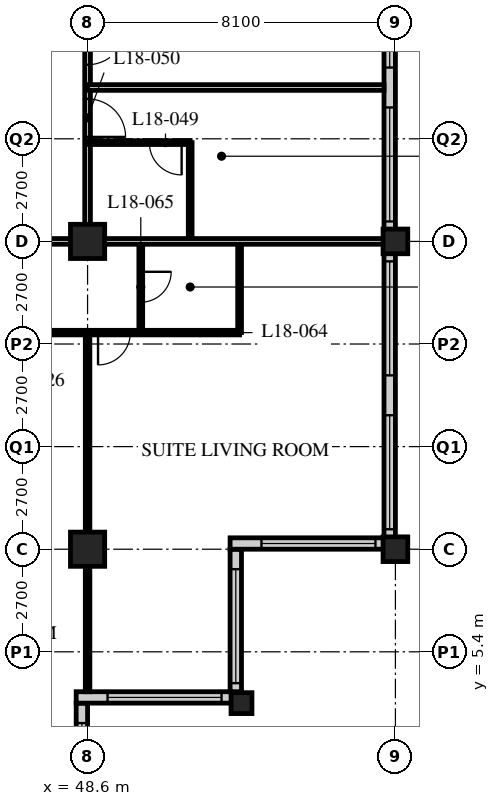
"""IFC4 building model, lengths in metres.
Left out: names, types, materials, properties, quantities, classifications, styles, units other than length and angle.
Written with IfcOpenShell. Run it as: python <this file> out.ifc"""

import sys

from ifc_helpers import new_model, si_unit, direction, frame, frame_2d, origin, origin_2d, place, context, subcontext, project, spatial, rectangle, hollow_rectangle, extrude, element, fill, save


model = new_model("IFC4")
c1 = context("Model", 3, precision=1e-05, world=origin(), true_north=direction((0.0, 1.0)))
c2 = subcontext(c1, "Body", "Model", "MODEL_VIEW")
j1 = project(units=[si_unit("LENGTHUNIT", "METRE"), si_unit("PLANEANGLEUNIT", "RADIAN")], contexts=[c1])
p1 = place(None, origin())
s1 = spatial("IfcSite", under=j1, at=p1, CompositionType="ELEMENT")
p2 = place(p1, origin())
s2 = spatial("IfcBuilding", under=s1, at=p2, CompositionType="ELEMENT")
p3 = place(p2, frame((0.0, 0.0, 73.8)))
s3 = spatial("IfcBuildingStorey", under=s2, at=p3, CompositionType="ELEMENT", Elevation=73.8)
for number, where, z_axis, x_axis in (
    (1, (48.6, 8.1, 0.0), (0.0, 0.0, 1.0), (1.0, 0.0, 0.0)),
    (2, (48.6, 16.2, 0.0), (0.0, 0.0, 1.0), (1.0, 0.0, 0.0)),
):
    element("IfcColumn", number, at=place(p3, frame(where, z_axis=z_axis, x_axis=x_axis)), inside=s3, PredefinedType="COLUMN", context=c2, shape_type="SweptSolid", body=[
        extrude(hollow_rectangle(XDim=0.9, YDim=0.9, WallThickness=0.09, at=origin_2d()), origin(), (0.0, 0.0, 1.0), 3.4),
    ])
p4 = place(p3, frame((52.65, 4.05, 0.0), z_axis=(0.0, 0.0, 1.0), x_axis=(1.0, 0.0, 0.0)))
e3 = element("IfcColumn", 3, at=p4, inside=s3, PredefinedType="COLUMN", context=c2, shape_type="SweptSolid", body=[
    extrude(hollow_rectangle(XDim=0.55, YDim=0.55, WallThickness=0.05, at=origin_2d()), origin(), (0.0, 0.0, 1.0), 3.4),
])
for number, where, z_axis, x_axis in (
    (4, (56.7, 8.1, 0.0), (0.0, 0.0, 1.0), (1.0, 0.0, 0.0)),
    (5, (56.7, 16.2, 0.0), (0.0, 0.0, 1.0), (1.0, 0.0, 0.0)),
):
    element("IfcColumn", number, at=place(p3, frame(where, z_axis=z_axis, x_axis=x_axis)), inside=s3, PredefinedType="COLUMN", context=c2, shape_type="SweptSolid", body=[
        extrude(hollow_rectangle(XDim=0.65, YDim=0.65, WallThickness=0.05, at=origin_2d()), origin(), (0.0, 0.0, 1.0), 3.4),
    ])
p5 = place(p3, frame((48.45, 0.3, 0.0), z_axis=(0.0, 0.0, 1.0), x_axis=(0.0, 1.0, 0.0)))
e6 = element("IfcWall", 6, at=p5, inside=s3, PredefinedType="SOLIDWALL", context=c2, shape_type="SweptSolid", body=[
    extrude(rectangle(XDim=3.75, YDim=0.3, at=frame_2d((1.875, 0.0))), origin(), (0.0, 0.0, 1.0), 3.19),
])
p6 = place(p5, frame((0.225, 0.0, 0.9)))
e7 = element("IfcOpeningElement", 7, at=p6, cuts=e6, PredefinedType="OPENING", context=c2, shape_type="SweptSolid", body=[
    extrude(rectangle(XDim=3.0, YDim=1.5, at=frame_2d((1.5, 0.75))), frame((0.0, 0.16, 0.0), z_axis=(0.0, -1.0, 0.0), x_axis=(1.0, 0.0, 0.0)), (0.0, 0.0, 1.0), 0.32),
])
p7 = place(p3, frame((48.3, 4.2, 0.0), z_axis=(0.0, 0.0, 1.0), x_axis=(1.0, 0.0, 0.0)))
e8 = element("IfcWall", 8, at=p7, inside=s3, PredefinedType="SOLIDWALL", context=c2, shape_type="SweptSolid", body=[
    extrude(rectangle(XDim=4.35, YDim=0.3, at=frame_2d((2.175, 0.0))), origin(), (0.0, 0.0, 1.0), 3.19),
])
p8 = place(p7, frame((0.825, 0.0, 0.9)))
e9 = element("IfcOpeningElement", 9, at=p8, cuts=e8, PredefinedType="OPENING", context=c2, shape_type="SweptSolid", body=[
    extrude(rectangle(XDim=3.0, YDim=1.5, at=frame_2d((1.5, 0.75))), frame((0.0, 0.16, 0.0), z_axis=(0.0, -1.0, 0.0), x_axis=(1.0, 0.0, 0.0)), (0.0, 0.0, 1.0), 0.32),
])
p9 = place(p3, frame((52.5, 4.35, 0.0), z_axis=(0.0, 0.0, 1.0), x_axis=(0.0, 1.0, 0.0)))
e10 = element("IfcWall", 10, at=p9, inside=s3, PredefinedType="SOLIDWALL", context=c2, shape_type="SweptSolid", body=[
    extrude(rectangle(XDim=3.75, YDim=0.3, at=frame_2d((1.875, 0.0))), origin(), (0.0, 0.0, 1.0), 3.19),
])
p10 = place(p9, frame((0.225, 0.0, 0.9)))
e11 = element("IfcOpeningElement", 11, at=p10, cuts=e10, PredefinedType="OPENING", context=c2, shape_type="SweptSolid", body=[
    extrude(rectangle(XDim=3.0, YDim=1.5, at=frame_2d((1.5, 0.75))), frame((0.0, 0.16, 0.0), z_axis=(0.0, -1.0, 0.0), x_axis=(1.0, 0.0, 0.0)), (0.0, 0.0, 1.0), 0.32),
])
p11 = place(p3, frame((52.35, 8.25, 0.0), z_axis=(0.0, 0.0, 1.0), x_axis=(1.0, 0.0, 0.0)))
e12 = element("IfcWall", 12, at=p11, inside=s3, PredefinedType="SOLIDWALL", context=c2, shape_type="SweptSolid", body=[
    extrude(rectangle(XDim=4.35, YDim=0.3, at=frame_2d((2.175, 0.0))), origin(), (0.0, 0.0, 1.0), 3.19),
])
p12 = place(p11, frame((0.825, 0.0, 0.9)))
e13 = element("IfcOpeningElement", 13, at=p12, cuts=e12, PredefinedType="OPENING", context=c2, shape_type="SweptSolid", body=[
    extrude(rectangle(XDim=3.0, YDim=1.5, at=frame_2d((1.5, 0.75))), frame((0.0, 0.16, 0.0), z_axis=(0.0, -1.0, 0.0), x_axis=(1.0, 0.0, 0.0)), (0.0, 0.0, 1.0), 0.32),
])
p13 = place(p3, frame((56.55, 8.4, 0.0), z_axis=(0.0, 0.0, 1.0), x_axis=(0.0, 1.0, 0.0)))
e14 = element("IfcWall", 14, at=p13, inside=s3, PredefinedType="SOLIDWALL", context=c2, shape_type="SweptSolid", body=[
    extrude(rectangle(XDim=32.1, YDim=0.3, at=frame_2d((16.05, 0.0))), origin(), (0.0, 0.0, 1.0), 3.19),
])
p14 = place(p13, frame((0.225, 0.0, 0.9)))
e15 = element("IfcOpeningElement", 15, at=p14, cuts=e14, PredefinedType="OPENING", context=c2, shape_type="SweptSolid", body=[
    extrude(rectangle(XDim=3.0, YDim=2.0, at=frame_2d((1.5, 1.0))), frame((0.0, 0.16, 0.0), z_axis=(0.0, -1.0, 0.0), x_axis=(1.0, 0.0, 0.0)), (0.0, 0.0, 1.0), 0.32),
])
p15 = place(p13, frame((4.275, 0.0, 0.9)))
e16 = element("IfcOpeningElement", 16, at=p15, cuts=e14, PredefinedType="OPENING", context=c2, shape_type="SweptSolid", body=[
    extrude(rectangle(XDim=3.0, YDim=2.0, at=frame_2d((1.5, 1.0))), frame((0.0, 0.16, 0.0), z_axis=(0.0, -1.0, 0.0), x_axis=(1.0, 0.0, 0.0)), (0.0, 0.0, 1.0), 0.32),
])
p16 = place(p13, frame((8.325, 0.0, 0.9)))
e17 = element("IfcOpeningElement", 17, at=p16, cuts=e14, PredefinedType="OPENING", context=c2, shape_type="SweptSolid", body=[
    extrude(rectangle(XDim=3.0, YDim=2.0, at=frame_2d((1.5, 1.0))), frame((0.0, 0.16, 0.0), z_axis=(0.0, -1.0, 0.0), x_axis=(1.0, 0.0, 0.0)), (0.0, 0.0, 1.0), 0.32),
])
p17 = place(p13, frame((12.375, 0.0, 0.9)))
e18 = element("IfcOpeningElement", 18, at=p17, cuts=e14, PredefinedType="OPENING", context=c2, shape_type="SweptSolid", body=[
    extrude(rectangle(XDim=3.0, YDim=2.0, at=frame_2d((1.5, 1.0))), frame((0.0, 0.16, 0.0), z_axis=(0.0, -1.0, 0.0), x_axis=(1.0, 0.0, 0.0)), (0.0, 0.0, 1.0), 0.32),
])
p18 = place(p13, frame((16.425, 0.0, 0.9)))
e19 = element("IfcOpeningElement", 19, at=p18, cuts=e14, PredefinedType="OPENING", context=c2, shape_type="SweptSolid", body=[
    extrude(rectangle(XDim=3.0, YDim=2.0, at=frame_2d((1.5, 1.0))), frame((0.0, 0.16, 0.0), z_axis=(0.0, -1.0, 0.0), x_axis=(1.0, 0.0, 0.0)), (0.0, 0.0, 1.0), 0.32),
])
p19 = place(p13, frame((20.475, 0.0, 0.9)))
e20 = element("IfcOpeningElement", 20, at=p19, cuts=e14, PredefinedType="OPENING", context=c2, shape_type="SweptSolid", body=[
    extrude(rectangle(XDim=3.0, YDim=2.0, at=frame_2d((1.5, 1.0))), frame((0.0, 0.16, 0.0), z_axis=(0.0, -1.0, 0.0), x_axis=(1.0, 0.0, 0.0)), (0.0, 0.0, 1.0), 0.32),
])
p20 = place(p13, frame((24.525, 0.0, 0.9)))
e21 = element("IfcOpeningElement", 21, at=p20, cuts=e14, PredefinedType="OPENING", context=c2, shape_type="SweptSolid", body=[
    extrude(rectangle(XDim=3.0, YDim=2.0, at=frame_2d((1.5, 1.0))), frame((0.0, 0.16, 0.0), z_axis=(0.0, -1.0, 0.0), x_axis=(1.0, 0.0, 0.0)), (0.0, 0.0, 1.0), 0.32),
])
p21 = place(p13, frame((28.575, 0.0, 0.9)))
e22 = element("IfcOpeningElement", 22, at=p21, cuts=e14, PredefinedType="OPENING", context=c2, shape_type="SweptSolid", body=[
    extrude(rectangle(XDim=3.0, YDim=2.0, at=frame_2d((1.5, 1.0))), frame((0.0, 0.16, 0.0), z_axis=(0.0, -1.0, 0.0), x_axis=(1.0, 0.0, 0.0)), (0.0, 0.0, 1.0), 0.32),
])
p22 = place(p3, frame((12.15, 16.2, 0.0), z_axis=(0.0, 0.0, 1.0), x_axis=(1.0, 0.0, 0.0)))
e23 = element("IfcWall", 23, at=p22, inside=s3, PredefinedType="PARTITIONING", context=c2, shape_type="SweptSolid", body=[
    extrude(rectangle(XDim=36.45, YDim=0.15, at=frame_2d((18.225, 0.0))), origin(), (0.0, 0.0, 1.0), 2.578),
])
p23 = place(p22, frame((6.5, 0.0, 0.0)))
e24 = element("IfcOpeningElement", 24, at=p23, cuts=e23, PredefinedType="OPENING", context=c2, shape_type="SweptSolid", body=[
    extrude(rectangle(XDim=1.0, YDim=2.1, at=frame_2d((0.5, 1.05))), frame((0.0, 0.085, 0.0), z_axis=(0.0, -1.0, 0.0), x_axis=(1.0, 0.0, 0.0)), (0.0, 0.0, 1.0), 0.17),
])
p24 = place(p22, frame((8.4, 0.0, 0.0)))
e25 = element("IfcOpeningElement", 25, at=p24, cuts=e23, PredefinedType="OPENING", context=c2, shape_type="SweptSolid", body=[
    extrude(rectangle(XDim=1.0, YDim=2.1, at=frame_2d((0.5, 1.05))), frame((0.0, 0.085, 0.0), z_axis=(0.0, -1.0, 0.0), x_axis=(1.0, 0.0, 0.0)), (0.0, 0.0, 1.0), 0.17),
])
p25 = place(p22, frame((14.9, 0.0, 0.0)))
e26 = element("IfcOpeningElement", 26, at=p25, cuts=e23, PredefinedType="OPENING", context=c2, shape_type="SweptSolid", body=[
    extrude(rectangle(XDim=1.0, YDim=2.1, at=frame_2d((0.5, 1.05))), frame((0.0, 0.085, 0.0), z_axis=(0.0, -1.0, 0.0), x_axis=(1.0, 0.0, 0.0)), (0.0, 0.0, 1.0), 0.17),
])
p26 = place(p22, frame((16.5, 0.0, 0.0)))
e27 = element("IfcOpeningElement", 27, at=p26, cuts=e23, PredefinedType="OPENING", context=c2, shape_type="SweptSolid", body=[
    extrude(rectangle(XDim=1.0, YDim=2.1, at=frame_2d((0.5, 1.05))), frame((0.0, 0.085, 0.0), z_axis=(0.0, -1.0, 0.0), x_axis=(1.0, 0.0, 0.0)), (0.0, 0.0, 1.0), 0.17),
])
p27 = place(p22, frame((22.7, 0.0, 0.0)))
e28 = element("IfcOpeningElement", 28, at=p27, cuts=e23, PredefinedType="OPENING", context=c2, shape_type="SweptSolid", body=[
    extrude(rectangle(XDim=1.0, YDim=2.1, at=frame_2d((0.5, 1.05))), frame((0.0, 0.085, 0.0), z_axis=(0.0, -1.0, 0.0), x_axis=(1.0, 0.0, 0.0)), (0.0, 0.0, 1.0), 0.17),
])
p28 = place(p22, frame((24.9, 0.0, 0.0)))
e29 = element("IfcOpeningElement", 29, at=p28, cuts=e23, PredefinedType="OPENING", context=c2, shape_type="SweptSolid", body=[
    extrude(rectangle(XDim=1.0, YDim=2.1, at=frame_2d((0.5, 1.05))), frame((0.0, 0.085, 0.0), z_axis=(0.0, -1.0, 0.0), x_axis=(1.0, 0.0, 0.0)), (0.0, 0.0, 1.0), 0.17),
])
p29 = place(p22, frame((30.8, 0.0, 0.0)))
e30 = element("IfcOpeningElement", 30, at=p29, cuts=e23, PredefinedType="OPENING", context=c2, shape_type="SweptSolid", body=[
    extrude(rectangle(XDim=1.0, YDim=2.1, at=frame_2d((0.5, 1.05))), frame((0.0, 0.085, 0.0), z_axis=(0.0, -1.0, 0.0), x_axis=(1.0, 0.0, 0.0)), (0.0, 0.0, 1.0), 0.17),
])
p30 = place(p22, frame((1.525, 0.0, 0.0)))
e31 = element("IfcOpeningElement", 31, at=p30, cuts=e23, PredefinedType="OPENING", context=c2, shape_type="SweptSolid", body=[
    extrude(rectangle(XDim=1.0, YDim=2.1, at=frame_2d((0.5, 1.05))), frame((0.0, 0.085, 0.0), z_axis=(0.0, -1.0, 0.0), x_axis=(1.0, 0.0, 0.0)), (0.0, 0.0, 1.0), 0.17),
])
p31 = place(p22, frame((33.925, 0.0, 0.0)))
e32 = element("IfcOpeningElement", 32, at=p31, cuts=e23, PredefinedType="OPENING", context=c2, shape_type="SweptSolid", body=[
    extrude(rectangle(XDim=1.0, YDim=2.1, at=frame_2d((0.5, 1.05))), frame((0.0, 0.085, 0.0), z_axis=(0.0, -1.0, 0.0), x_axis=(1.0, 0.0, 0.0)), (0.0, 0.0, 1.0), 0.17),
])
p32 = place(p3, frame((48.6, 16.2, 0.0), z_axis=(0.0, 0.0, 1.0), x_axis=(0.0, 1.0, 0.0)))
e33 = element("IfcWall", 33, at=p32, inside=s3, PredefinedType="PARTITIONING", context=c2, shape_type="SweptSolid", body=[
    extrude(rectangle(XDim=26.1, YDim=0.15, at=frame_2d((13.05, 0.0))), origin(), (0.0, 0.0, 1.0), 2.578),
])
p33 = place(p32, frame((2.75, 0.0, 0.0)))
e34 = element("IfcOpeningElement", 34, at=p33, cuts=e33, PredefinedType="OPENING", context=c2, shape_type="SweptSolid", body=[
    extrude(rectangle(XDim=1.0, YDim=2.1, at=frame_2d((0.5, 1.05))), frame((0.0, 0.085, 0.0), z_axis=(0.0, -1.0, 0.0), x_axis=(1.0, 0.0, 0.0)), (0.0, 0.0, 1.0), 0.17),
])
p34 = place(p32, frame((4.65, 0.0, 0.0)))
e35 = element("IfcOpeningElement", 35, at=p34, cuts=e33, PredefinedType="OPENING", context=c2, shape_type="SweptSolid", body=[
    extrude(rectangle(XDim=1.0, YDim=2.1, at=frame_2d((0.5, 1.05))), frame((0.0, 0.085, 0.0), z_axis=(0.0, -1.0, 0.0), x_axis=(1.0, 0.0, 0.0)), (0.0, 0.0, 1.0), 0.17),
])
p35 = place(p32, frame((13.55, 0.0, 0.0)))
e36 = element("IfcOpeningElement", 36, at=p35, cuts=e33, PredefinedType="OPENING", context=c2, shape_type="SweptSolid", body=[
    extrude(rectangle(XDim=1.0, YDim=2.1, at=frame_2d((0.5, 1.05))), frame((0.0, 0.085, 0.0), z_axis=(0.0, -1.0, 0.0), x_axis=(1.0, 0.0, 0.0)), (0.0, 0.0, 1.0), 0.17),
])
p36 = place(p32, frame((21.65, 0.0, 0.0)))
e37 = element("IfcOpeningElement", 37, at=p36, cuts=e33, PredefinedType="OPENING", context=c2, shape_type="SweptSolid", body=[
    extrude(rectangle(XDim=1.0, YDim=2.1, at=frame_2d((0.5, 1.05))), frame((0.0, 0.085, 0.0), z_axis=(0.0, -1.0, 0.0), x_axis=(1.0, 0.0, 0.0)), (0.0, 0.0, 1.0), 0.17),
])
p37 = place(p3, frame((51.3, 16.2, 0.0), z_axis=(0.0, 0.0, 1.0), x_axis=(0.0, 1.0, 0.0)))
e38 = element("IfcWall", 38, at=p37, inside=s3, PredefinedType="PARTITIONING", context=c2, shape_type="SweptSolid", body=[
    extrude(rectangle(XDim=2.6, YDim=0.1, at=frame_2d((1.3, 0.0))), origin(), (0.0, 0.0, 1.0), 3.19),
])
p38 = place(p3, frame((48.6, 18.8, 0.0), z_axis=(0.0, 0.0, 1.0), x_axis=(1.0, 0.0, 0.0)))
e39 = element("IfcWall", 39, at=p38, inside=s3, PredefinedType="PARTITIONING", context=c2, shape_type="SweptSolid", body=[
    extrude(rectangle(XDim=2.7, YDim=0.1, at=frame_2d((1.35, 0.0))), origin(), (0.0, 0.0, 1.0), 3.19),
])
p39 = place(p38, frame((1.625, 0.0, 0.0)))
e40 = element("IfcOpeningElement", 40, at=p39, cuts=e39, PredefinedType="OPENING", context=c2, shape_type="SweptSolid", body=[
    extrude(rectangle(XDim=0.85, YDim=2.1, at=frame_2d((0.425, 1.05))), frame((0.0, 0.06, 0.0), z_axis=(0.0, -1.0, 0.0), x_axis=(1.0, 0.0, 0.0)), (0.0, 0.0, 1.0), 0.12),
])
p40 = place(p3, frame((48.6, 20.25, 0.0), z_axis=(0.0, 0.0, 1.0), x_axis=(1.0, 0.0, 0.0)))
e41 = element("IfcWall", 41, at=p40, inside=s3, PredefinedType="PARTITIONING", context=c2, shape_type="SweptSolid", body=[
    extrude(rectangle(XDim=7.8, YDim=0.15, at=frame_2d((3.9, 0.0))), origin(), (0.0, 0.0, 1.0), 3.19),
])
p41 = place(p3, frame((44.55, 13.8, 0.0), z_axis=(0.0, 0.0, 1.0), x_axis=(1.0, 0.0, 0.0)))
e42 = element("IfcWall", 42, at=p41, inside=s3, PredefinedType="PARTITIONING", context=c2, shape_type="SweptSolid", body=[
    extrude(rectangle(XDim=8.05, YDim=0.12, at=frame_2d((4.025, 0.0))), origin(), (0.0, 0.0, 1.0), 3.19),
])
p42 = place(p41, frame((0.475, 0.0, 0.0)))
e43 = element("IfcOpeningElement", 43, at=p42, cuts=e42, PredefinedType="OPENING", context=c2, shape_type="SweptSolid", body=[
    extrude(rectangle(XDim=0.85, YDim=2.1, at=frame_2d((0.425, 1.05))), frame((0.0, 0.07, 0.0), z_axis=(0.0, -1.0, 0.0), x_axis=(1.0, 0.0, 0.0)), (0.0, 0.0, 1.0), 0.14),
])
p43 = place(p41, frame((4.325, 0.0, 0.0)))
e44 = element("IfcOpeningElement", 44, at=p43, cuts=e42, PredefinedType="OPENING", context=c2, shape_type="SweptSolid", body=[
    extrude(rectangle(XDim=0.85, YDim=2.1, at=frame_2d((0.425, 1.05))), frame((0.0, 0.07, 0.0), z_axis=(0.0, -1.0, 0.0), x_axis=(1.0, 0.0, 0.0)), (0.0, 0.0, 1.0), 0.14),
])
p44 = place(p3, frame((50.0, 16.2, 0.0), z_axis=(0.0, 0.0, 1.0), x_axis=(0.0, -1.0, 0.0)))
e45 = element("IfcWall", 45, at=p44, inside=s3, PredefinedType="PARTITIONING", context=c2, shape_type="SweptSolid", body=[
    extrude(rectangle(XDim=2.4, YDim=0.1, at=frame_2d((1.2, 0.0))), origin(), (0.0, 0.0, 1.0), 3.19),
])
p45 = place(p44, frame((0.8, 0.0, 0.0)))
e46 = element("IfcOpeningElement", 46, at=p45, cuts=e45, PredefinedType="OPENING", context=c2, shape_type="SweptSolid", body=[
    extrude(rectangle(XDim=0.8, YDim=2.1, at=frame_2d((0.4, 1.05))), frame((0.0, 0.06, 0.0), z_axis=(0.0, -1.0, 0.0), x_axis=(1.0, 0.0, 0.0)), (0.0, 0.0, 1.0), 0.12),
])
p46 = place(p3, frame((52.6, 16.2, 0.0), z_axis=(0.0, 0.0, 1.0), x_axis=(0.0, -1.0, 0.0)))
e47 = element("IfcWall", 47, at=p46, inside=s3, PredefinedType="PARTITIONING", context=c2, shape_type="SweptSolid", body=[
    extrude(rectangle(XDim=2.4, YDim=0.1, at=frame_2d((1.2, 0.0))), origin(), (0.0, 0.0, 1.0), 3.19),
])
p47 = place(p3, frame((48.6, 13.8, 0.0), z_axis=(0.0, 0.0, 1.0), x_axis=(0.0, -1.0, 0.0)))
e48 = element("IfcWall", 48, at=p47, inside=s3, PredefinedType="PARTITIONING", context=c2, shape_type="SweptSolid", body=[
    extrude(rectangle(XDim=9.45, YDim=0.12, at=frame_2d((4.725, 0.0))), origin(), (0.0, 0.0, 1.0), 2.578),
])
p48 = place(p3, frame((48.6, 16.2, 0.0), z_axis=(0.0, 0.0, 1.0), x_axis=(1.0, 0.0, 0.0)))
e49 = element("IfcWall", 49, at=p48, inside=s3, PredefinedType="PARTITIONING", context=c2, shape_type="SweptSolid", body=[
    extrude(rectangle(XDim=7.8, YDim=0.15, at=frame_2d((3.9, 0.0))), origin(), (0.0, 0.0, 1.0), 2.578),
])
p49 = place(p6, origin())
e50 = element("IfcWindow", 50, at=p49, inside=s3, PartitioningType="SINGLE_PANEL", PredefinedType="WINDOW", context=c2, shape_type="SweptSolid", body=[
    extrude(rectangle(XDim=3.0, YDim=1.5, at=frame_2d((1.5, 0.75))), frame((0.0, 0.03, 0.0), z_axis=(0.0, -1.0, 0.0), x_axis=(1.0, 0.0, 0.0)), (0.0, 0.0, 1.0), 0.06),
])
fill(e7, e50)
p50 = place(p8, origin())
e51 = element("IfcWindow", 51, at=p50, inside=s3, PartitioningType="SINGLE_PANEL", PredefinedType="WINDOW", context=c2, shape_type="SweptSolid", body=[
    extrude(rectangle(XDim=3.0, YDim=1.5, at=frame_2d((1.5, 0.75))), frame((0.0, 0.03, 0.0), z_axis=(0.0, -1.0, 0.0), x_axis=(1.0, 0.0, 0.0)), (0.0, 0.0, 1.0), 0.06),
])
fill(e9, e51)
p51 = place(p10, origin())
e52 = element("IfcWindow", 52, at=p51, inside=s3, PartitioningType="SINGLE_PANEL", PredefinedType="WINDOW", context=c2, shape_type="SweptSolid", body=[
    extrude(rectangle(XDim=3.0, YDim=1.5, at=frame_2d((1.5, 0.75))), frame((0.0, 0.03, 0.0), z_axis=(0.0, -1.0, 0.0), x_axis=(1.0, 0.0, 0.0)), (0.0, 0.0, 1.0), 0.06),
])
fill(e11, e52)
p52 = place(p12, origin())
e53 = element("IfcWindow", 53, at=p52, inside=s3, PartitioningType="SINGLE_PANEL", PredefinedType="WINDOW", context=c2, shape_type="SweptSolid", body=[
    extrude(rectangle(XDim=3.0, YDim=1.5, at=frame_2d((1.5, 0.75))), frame((0.0, 0.03, 0.0), z_axis=(0.0, -1.0, 0.0), x_axis=(1.0, 0.0, 0.0)), (0.0, 0.0, 1.0), 0.06),
])
fill(e13, e53)
p53 = place(p14, origin())
e54 = element("IfcWindow", 54, at=p53, inside=s3, PartitioningType="SINGLE_PANEL", PredefinedType="WINDOW", context=c2, shape_type="SweptSolid", body=[
    extrude(rectangle(XDim=3.0, YDim=2.0, at=frame_2d((1.5, 1.0))), frame((0.0, 0.03, 0.0), z_axis=(0.0, -1.0, 0.0), x_axis=(1.0, 0.0, 0.0)), (0.0, 0.0, 1.0), 0.06),
])
fill(e15, e54)
p54 = place(p15, origin())
e55 = element("IfcWindow", 55, at=p54, inside=s3, PartitioningType="SINGLE_PANEL", PredefinedType="WINDOW", context=c2, shape_type="SweptSolid", body=[
    extrude(rectangle(XDim=3.0, YDim=2.0, at=frame_2d((1.5, 1.0))), frame((0.0, 0.03, 0.0), z_axis=(0.0, -1.0, 0.0), x_axis=(1.0, 0.0, 0.0)), (0.0, 0.0, 1.0), 0.06),
])
fill(e16, e55)
p55 = place(p16, origin())
e56 = element("IfcWindow", 56, at=p55, inside=s3, PartitioningType="SINGLE_PANEL", PredefinedType="WINDOW", context=c2, shape_type="SweptSolid", body=[
    extrude(rectangle(XDim=3.0, YDim=2.0, at=frame_2d((1.5, 1.0))), frame((0.0, 0.03, 0.0), z_axis=(0.0, -1.0, 0.0), x_axis=(1.0, 0.0, 0.0)), (0.0, 0.0, 1.0), 0.06),
])
fill(e17, e56)
p56 = place(p17, origin())
e57 = element("IfcWindow", 57, at=p56, inside=s3, PartitioningType="SINGLE_PANEL", PredefinedType="WINDOW", context=c2, shape_type="SweptSolid", body=[
    extrude(rectangle(XDim=3.0, YDim=2.0, at=frame_2d((1.5, 1.0))), frame((0.0, 0.03, 0.0), z_axis=(0.0, -1.0, 0.0), x_axis=(1.0, 0.0, 0.0)), (0.0, 0.0, 1.0), 0.06),
])
fill(e18, e57)
p57 = place(p39, origin())
e58 = element("IfcDoor", 58, at=p57, inside=s3, OperationType="SINGLE_SWING_LEFT", PredefinedType="DOOR", context=c2, shape_type="SweptSolid", body=[
    extrude(rectangle(XDim=0.85, YDim=2.1, at=frame_2d((0.425, 1.05))), frame((0.0, 0.025, 0.0), z_axis=(0.0, -1.0, 0.0), x_axis=(1.0, 0.0, 0.0)), (0.0, 0.0, 1.0), 0.05),
])
fill(e40, e58)
p58 = place(p33, origin())
e59 = element("IfcDoor", 59, at=p58, inside=s3, OperationType="SINGLE_SWING_RIGHT", PredefinedType="DOOR", context=c2, shape_type="SweptSolid", body=[
    extrude(rectangle(XDim=1.0, YDim=2.1, at=frame_2d((0.5, 1.05))), frame((0.0, 0.025, 0.0), z_axis=(0.0, -1.0, 0.0), x_axis=(1.0, 0.0, 0.0)), (0.0, 0.0, 1.0), 0.05),
])
fill(e34, e59)
p59 = place(p34, origin())
e60 = element("IfcDoor", 60, at=p59, inside=s3, OperationType="SINGLE_SWING_LEFT", PredefinedType="DOOR", context=c2, shape_type="SweptSolid", body=[
    extrude(rectangle(XDim=1.0, YDim=2.1, at=frame_2d((0.5, 1.05))), frame((0.0, 0.025, 0.0), z_axis=(0.0, -1.0, 0.0), x_axis=(1.0, 0.0, 0.0)), (0.0, 0.0, 1.0), 0.05),
])
fill(e35, e60)
p60 = place(p45, origin())
e61 = element("IfcDoor", 61, at=p60, inside=s3, OperationType="SINGLE_SWING_LEFT", PredefinedType="DOOR", context=c2, shape_type="SweptSolid", body=[
    extrude(rectangle(XDim=0.8, YDim=2.1, at=frame_2d((0.4, 1.05))), frame((0.0, 0.025, 0.0), z_axis=(0.0, -1.0, 0.0), x_axis=(1.0, 0.0, 0.0)), (0.0, 0.0, 1.0), 0.05),
])
fill(e46, e61)
p61 = place(p43, origin())
e62 = element("IfcDoor", 62, at=p61, inside=s3, OperationType="SINGLE_SWING_RIGHT", PredefinedType="DOOR", context=c2, shape_type="SweptSolid", body=[
    extrude(rectangle(XDim=0.85, YDim=2.1, at=frame_2d((0.425, 1.05))), frame((0.0, 0.025, 0.0), z_axis=(0.0, -1.0, 0.0), x_axis=(1.0, 0.0, 0.0)), (0.0, 0.0, 1.0), 0.05),
])
fill(e44, e62)
save(model, sys.argv[1])
